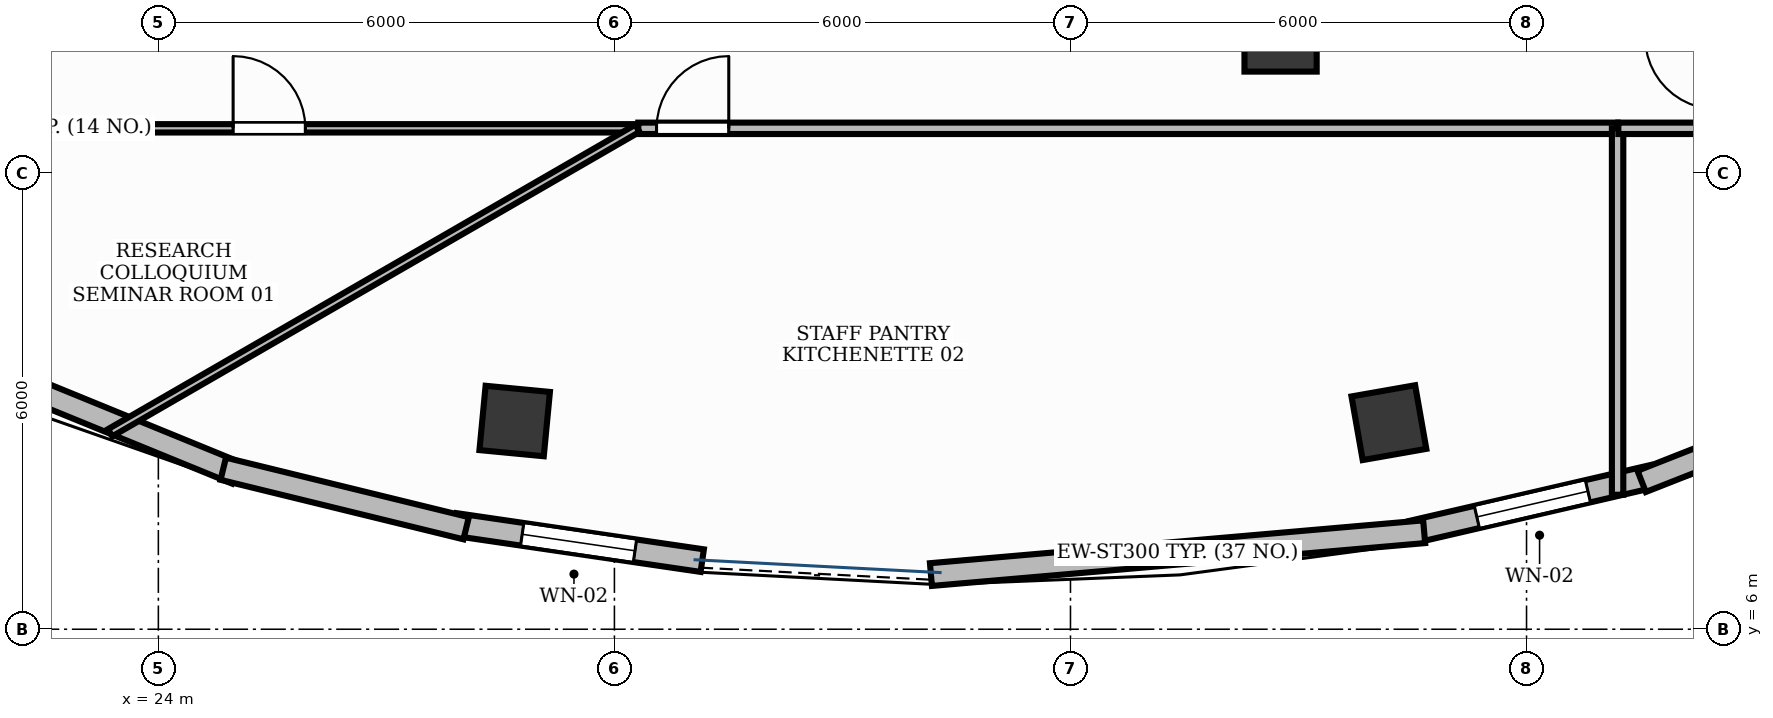
"""IFC4 building model, lengths in metres.
Left out: names, types, materials, properties, quantities, classifications, styles, units other than length and angle.
Written with IfcOpenShell. Run it as: python <this file> out.ifc"""

import sys

from ifc_helpers import new_model, si_unit, direction, frame, frame_2d, origin, origin_2d, place, context, subcontext, project, spatial, rectangle, extrude, element, fill, save


model = new_model("IFC4")
c1 = context("Model", 3, precision=1e-05, world=origin(), true_north=direction((0.0, 1.0)))
c2 = subcontext(c1, "Body", "Model", "MODEL_VIEW")
j1 = project(units=[si_unit("LENGTHUNIT", "METRE"), si_unit("PLANEANGLEUNIT", "RADIAN")], contexts=[c1])
p1 = place(None, origin())
s1 = spatial("IfcSite", under=j1, at=p1, CompositionType="ELEMENT")
p2 = place(p1, origin())
s2 = spatial("IfcBuilding", under=s1, at=p2, CompositionType="ELEMENT")
p3 = place(p2, frame((0.0, 0.0, 268.8)))
s3 = spatial("IfcBuildingStorey", under=s2, at=p3, CompositionType="ELEMENT", Elevation=268.8)
for number, where, z_axis, x_axis in (
    (1, (28.688, 8.739, -0.0), (0.0, 0.0, 1.0), (-0.995, 0.095, 0.0)),
    (2, (40.189, 8.718, -0.0), (0.0, 0.0, 1.0), (0.985, 0.173, 0.0)),
):
    element("IfcColumn", number, at=place(p3, frame(where, z_axis=z_axis, x_axis=x_axis)), inside=s3, PredefinedType="COLUMN", context=c2, shape_type="SweptSolid", body=[
        extrude(rectangle(XDim=0.85, YDim=0.85, at=origin_2d()), origin(), (0.0, 0.0, 1.0), 3.901),
    ])
p4 = place(p3, frame((38.764, 13.811, -0.0), z_axis=(0.0, 0.0, 1.0), x_axis=(1.0, 0.0, 0.0)))
e3 = element("IfcColumn", 3, at=p4, inside=s3, PredefinedType="COLUMN", context=c2, shape_type="SweptSolid", body=[
    extrude(rectangle(XDim=0.95, YDim=0.95, at=origin_2d()), origin(), (0.0, 0.0, 1.0), 3.901),
])
p5 = place(p3, frame((27.902, 7.379, 0.0), z_axis=(0.0, 0.0, 1.0), x_axis=(0.989461064134, -0.144799180117, 0.0)))
e4 = element("IfcWall", 4, at=p5, inside=s3, PredefinedType="STANDARD", context=c2, shape_type="SweptSolid", body=[
    extrude(rectangle(XDim=3.288, YDim=0.3, at=frame_2d((1.644, 0.0))), origin(), (0.0, 0.0, 1.0), 3.9),
])
p6 = place(p5, frame((0.894, 0.0, 0.95)))
e5 = element("IfcOpeningElement", 5, at=p6, cuts=e4, PredefinedType="OPENING", context=c2, shape_type="SweptSolid", body=[
    extrude(rectangle(XDim=1.5, YDim=1.8, at=frame_2d((0.75, 0.9))), frame((0.0, 0.165, 0.0), z_axis=(0.0, -1.0, 0.0), x_axis=(1.0, 0.0, 0.0)), (0.0, 0.0, 1.0), 0.33),
])
p7 = place(p3, frame((40.491, 7.279, 0.0), z_axis=(0.0, 0.0, 1.0), x_axis=(0.974196208509, 0.225702785377, 0.0)))
e6 = element("IfcWall", 6, at=p7, inside=s3, PredefinedType="STANDARD", context=c2, shape_type="SweptSolid", body=[
    extrude(rectangle(XDim=3.256, YDim=0.3, at=frame_2d((1.628, 0.0))), origin(), (0.0, 0.0, 1.0), 3.9),
])
p8 = place(p7, frame((0.878, 0.0, 0.95)))
e7 = element("IfcOpeningElement", 7, at=p8, cuts=e6, PredefinedType="OPENING", context=c2, shape_type="SweptSolid", body=[
    extrude(rectangle(XDim=1.5, YDim=1.8, at=frame_2d((0.75, 0.9))), frame((0.0, 0.165, 0.0), z_axis=(0.0, -1.0, 0.0), x_axis=(1.0, 0.0, 0.0)), (0.0, 0.0, 1.0), 0.33),
])
p9 = place(p3, frame((19.253, 10.415, 0.0), z_axis=(0.0, 0.0, 1.0), x_axis=(0.925644837168, -0.378393492841, 0.0)))
e8 = element("IfcWall", 8, at=p9, inside=s3, PredefinedType="STANDARD", context=c2, shape_type="SweptSolid", body=[
    extrude(rectangle(XDim=6.236, YDim=0.3, at=frame_2d((3.118, 0.0))), origin(), (0.0, 0.0, 1.0), 3.47),
])
p10 = place(p3, frame((24.854, 8.111, 0.0), z_axis=(0.0, 0.0, 1.0), x_axis=(0.971305358754, -0.23783586789, 0.0)))
e9 = element("IfcWall", 9, at=p10, inside=s3, PredefinedType="STANDARD", context=c2, shape_type="SweptSolid", body=[
    extrude(rectangle(XDim=3.29, YDim=0.3, at=frame_2d((1.645, 0.0))), origin(), (0.0, 0.0, 1.0), 3.9),
])
p11 = place(p3, frame((34.164, 6.719, 0.0), z_axis=(0.0, 0.0, 1.0), x_axis=(0.996250708408, 0.086513155053, 0.0)))
e10 = element("IfcWall", 10, at=p11, inside=s3, PredefinedType="STANDARD", context=c2, shape_type="SweptSolid", body=[
    extrude(rectangle(XDim=6.513, YDim=0.3, at=frame_2d((3.257, 0.0))), origin(), (0.0, 0.0, 1.0), 3.9),
])
p12 = place(p3, frame((43.515, 7.945, 0.0), z_axis=(0.0, 0.0, 1.0), x_axis=(0.930516880158, 0.366249007836, 0.0)))
e11 = element("IfcWall", 11, at=p12, inside=s3, PredefinedType="STANDARD", context=c2, shape_type="SweptSolid", body=[
    extrude(rectangle(XDim=6.253, YDim=0.3, at=frame_2d((3.127, 0.0))), origin(), (0.0, 0.0, 1.0), 3.9),
])
p13 = place(p3, frame((20.114, 12.59, 0.0), z_axis=(0.0, 0.0, 1.0), x_axis=(1.0, 0.0, 0.0)))
e12 = element("IfcWall", 12, at=p13, inside=s3, PredefinedType="MOVABLE", context=c2, shape_type="SweptSolid", body=[
    extrude(rectangle(XDim=10.188, YDim=0.11, at=frame_2d((5.094, 0.0))), origin(), (0.0, 0.0, 1.0), 2.91),
])
p14 = place(p13, frame((4.87, 0.0, 0.0)))
e13 = element("IfcOpeningElement", 13, at=p14, cuts=e12, PredefinedType="OPENING", context=c2, shape_type="SweptSolid", body=[
    extrude(rectangle(XDim=0.95, YDim=2.15, at=frame_2d((0.475, 1.075))), frame((0.0, 0.07, 0.0), z_axis=(0.0, -1.0, 0.0), x_axis=(1.0, 0.0, 0.0)), (0.0, 0.0, 1.0), 0.14),
])
p15 = place(p3, frame((30.314, 12.59, 0.0), z_axis=(0.0, 0.0, 1.0), x_axis=(1.0, 0.0, 0.0)))
e14 = element("IfcWall", 14, at=p15, inside=s3, PredefinedType="PARTITIONING", context=c2, shape_type="SweptSolid", body=[
    extrude(rectangle(XDim=12.884, YDim=0.15, at=frame_2d((6.442, 0.0))), origin(), (0.0, 0.0, 1.0), 2.91),
])
p16 = place(p15, frame((0.24, 0.0, 0.0)))
e15 = element("IfcOpeningElement", 15, at=p16, cuts=e14, PredefinedType="OPENING", context=c2, shape_type="SweptSolid", body=[
    extrude(rectangle(XDim=0.95, YDim=2.15, at=frame_2d((0.475, 1.075))), frame((0.0, 0.09, 0.0), z_axis=(0.0, -1.0, 0.0), x_axis=(1.0, 0.0, 0.0)), (0.0, 0.0, 1.0), 0.18),
])
p17 = place(p3, frame((30.302, 12.59, 0.0), z_axis=(0.0, 0.0, 1.0), x_axis=(-0.866017589642, -0.500013534248, 0.0)))
e16 = element("IfcWall", 16, at=p17, inside=s3, PredefinedType="MOVABLE", context=c2, shape_type="SweptSolid", body=[
    extrude(rectangle(XDim=8.01, YDim=0.11, at=frame_2d((4.005, 0.0))), origin(), (0.0, 0.0, 1.0), 2.91),
])
p18 = place(p3, frame((43.198, 12.59, 0.0), z_axis=(0.0, 0.0, 1.0), x_axis=(0.0, -1.0, 0.0)))
e17 = element("IfcWall", 17, at=p18, inside=s3, PredefinedType="PARTITIONING", context=c2, shape_type="SweptSolid", body=[
    extrude(rectangle(XDim=4.821, YDim=0.15, at=frame_2d((2.41, 0.0))), origin(), (0.0, 0.0, 1.0), 2.91),
])
p19 = place(p3, frame((43.208, 12.59, 0.0), z_axis=(0.0, 0.0, 1.0), x_axis=(1.0, 0.0, 0.0)))
e18 = element("IfcWall", 18, at=p19, inside=s3, PredefinedType="PARTITIONING", context=c2, shape_type="SweptSolid", body=[
    extrude(rectangle(XDim=1.292, YDim=0.15, at=frame_2d((0.646, 0.0))), origin(), (0.0, 0.0, 1.0), 2.91),
])
p20 = place(p6, origin())
e19 = element("IfcWindow", 19, at=p20, inside=s3, PartitioningType="DOUBLE_PANEL_VERTICAL", PredefinedType="WINDOW", context=c2, shape_type="SweptSolid", body=[
    extrude(rectangle(XDim=1.5, YDim=1.8, at=frame_2d((0.75, 0.9))), frame((0.0, 0.03, 0.0), z_axis=(0.0, -1.0, 0.0), x_axis=(1.0, 0.0, 0.0)), (0.0, 0.0, 1.0), 0.06),
])
fill(e5, e19)
p21 = place(p8, origin())
e20 = element("IfcWindow", 20, at=p21, inside=s3, PartitioningType="DOUBLE_PANEL_VERTICAL", PredefinedType="WINDOW", context=c2, shape_type="SweptSolid", body=[
    extrude(rectangle(XDim=1.5, YDim=1.8, at=frame_2d((0.75, 0.9))), frame((0.0, 0.03, 0.0), z_axis=(0.0, -1.0, 0.0), x_axis=(1.0, 0.0, 0.0)), (0.0, 0.0, 1.0), 0.06),
])
fill(e7, e20)
p22 = place(p14, origin())
e21 = element("IfcDoor", 21, at=p22, inside=s3, OperationType="SINGLE_SWING_LEFT", PredefinedType="DOOR", context=c2, shape_type="SweptSolid", body=[
    extrude(rectangle(XDim=0.95, YDim=2.15, at=frame_2d((0.475, 1.075))), frame((0.0, 0.025, 0.0), z_axis=(0.0, -1.0, 0.0), x_axis=(1.0, 0.0, 0.0)), (0.0, 0.0, 1.0), 0.05),
])
fill(e13, e21)
p23 = place(p16, origin())
e22 = element("IfcDoor", 22, at=p23, inside=s3, OperationType="SINGLE_SWING_RIGHT", PredefinedType="DOOR", context=c2, shape_type="SweptSolid", body=[
    extrude(rectangle(XDim=0.95, YDim=2.15, at=frame_2d((0.475, 1.075))), frame((0.0, 0.025, 0.0), z_axis=(0.0, -1.0, 0.0), x_axis=(1.0, 0.0, 0.0)), (0.0, 0.0, 1.0), 0.05),
])
fill(e15, e22)
save(model, sys.argv[1])
